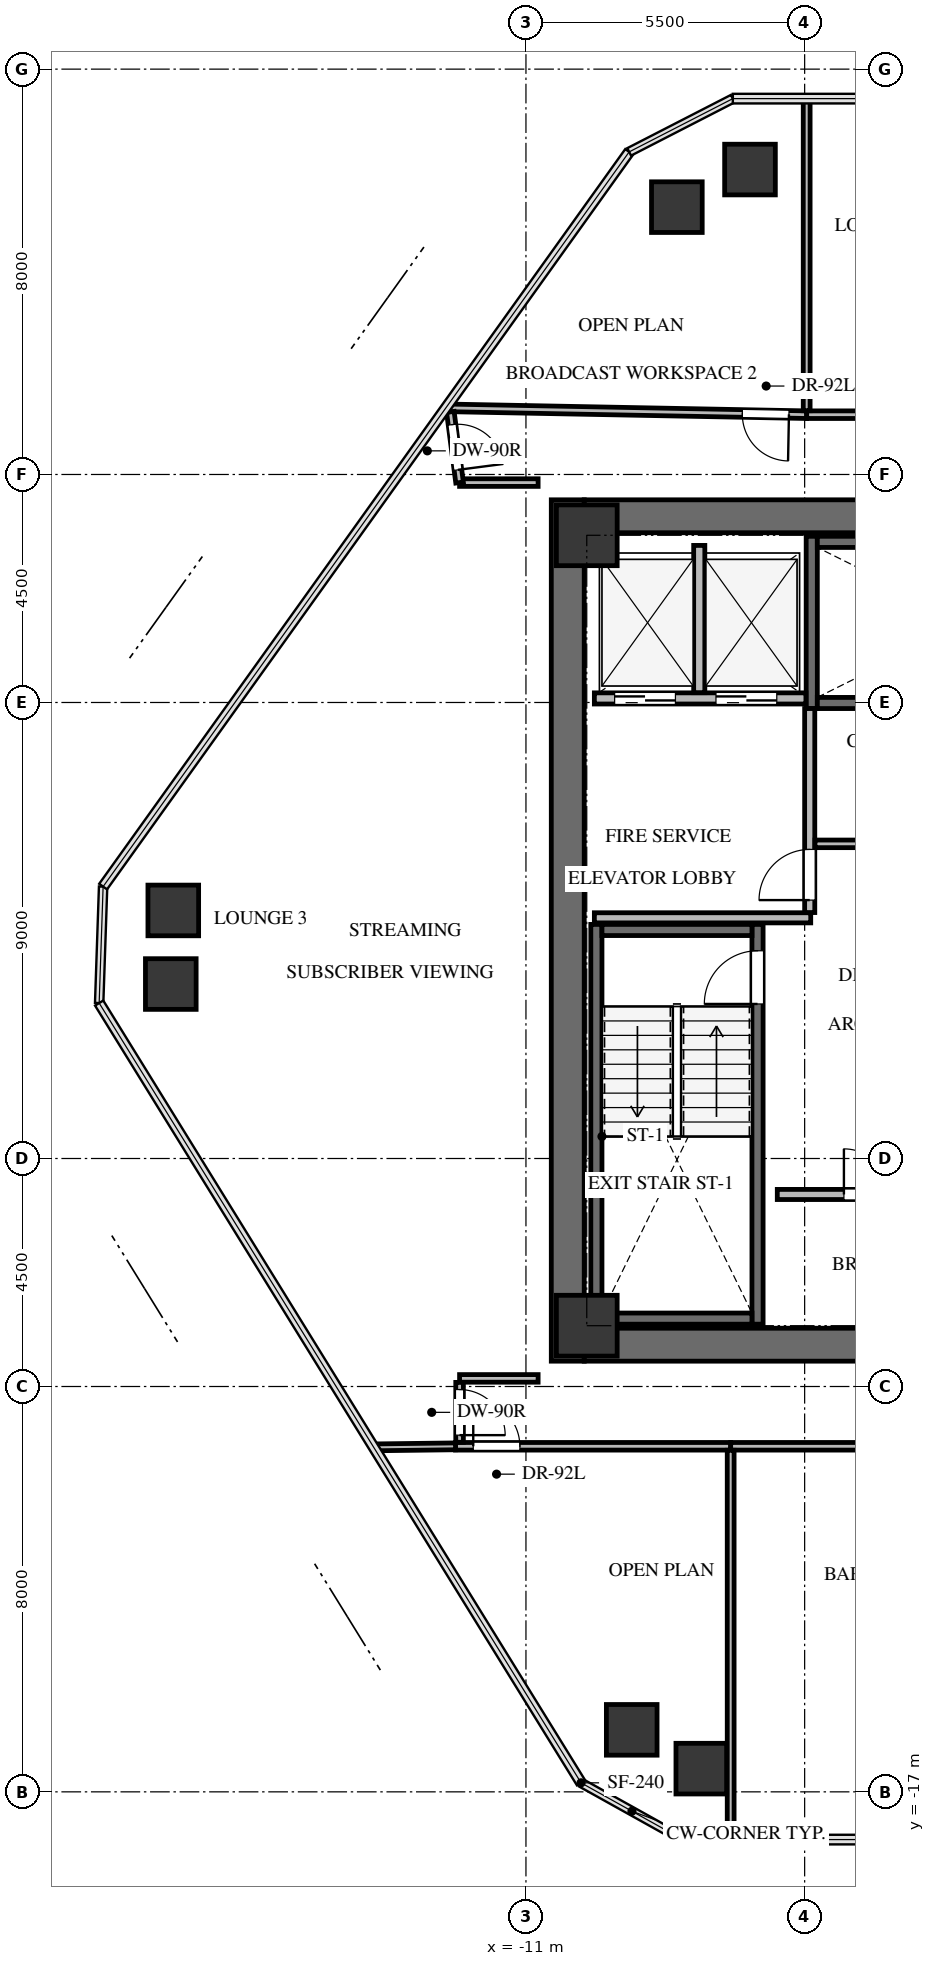
"""IFC4 building model, lengths in metres.
Left out: names, types, materials, properties, quantities, classifications, styles, units other than length and angle.
Written with IfcOpenShell. Run it as: python <this file> out.ifc"""

import sys

from ifc_helpers import new_model, si_unit, direction, frame, frame_2d, origin, origin_2d, place, context, subcontext, project, spatial, rectangle, extrude, source, transform, mapped, element, fill, save


model = new_model("IFC4")
c1 = context("Model", 3, precision=1e-05, world=origin(), true_north=direction((0.0, 1.0)))
c2 = subcontext(c1, "Body", "Model", "MODEL_VIEW")
j1 = project(units=[si_unit("LENGTHUNIT", "METRE"), si_unit("PLANEANGLEUNIT", "RADIAN")], contexts=[c1])
p1 = place(None, origin())
s1 = spatial("IfcSite", under=j1, at=p1, CompositionType="ELEMENT")
p2 = place(p1, origin())
s2 = spatial("IfcBuilding", under=s1, at=p2, CompositionType="ELEMENT")
p3 = place(p2, frame((0.0, 0.0, 183.7)))
s3 = spatial("IfcBuildingStorey", under=s2, at=p3, CompositionType="ELEMENT", Elevation=183.7)
p4 = place(p3, frame((-10.175, -8.5, 0.0), z_axis=(0.0, 0.0, 1.0), x_axis=(0.0, 1.0, 0.0)))
e1 = element("IfcWall", 1, at=p4, inside=s3, PredefinedType="SHEAR", context=c2, shape_type="SweptSolid", body=[
    extrude(rectangle(XDim=17.0, YDim=0.65, at=frame_2d((8.5, 0.0))), origin(), (0.0, 0.0, 1.0), 3.3),
])
p5 = place(p3, frame((-9.85, -8.175, 0.0), z_axis=(0.0, 0.0, 1.0), x_axis=(1.0, 0.0, 0.0)))
e2 = element("IfcWall", 2, at=p5, inside=s3, PredefinedType="SHEAR", context=c2, shape_type="SweptSolid", body=[
    extrude(rectangle(XDim=7.75, YDim=0.65, at=frame_2d((3.875, 0.0))), origin(), (0.0, 0.0, 1.0), 3.3),
])
p6 = place(p3, frame((-9.85, 8.175, 0.0), z_axis=(0.0, 0.0, 1.0), x_axis=(1.0, 0.0, 0.0)))
e3 = element("IfcWall", 3, at=p6, inside=s3, PredefinedType="SHEAR", context=c2, shape_type="SweptSolid", body=[
    extrude(rectangle(XDim=19.7, YDim=0.65, at=frame_2d((9.85, 0.0))), origin(), (0.0, 0.0, 1.0), 3.3),
])
p7 = place(p3, frame((-6.43, -7.77, -0.24), z_axis=(0.0, 0.0, 1.0), x_axis=(0.0, 1.0, 0.0)))
e4 = element("IfcWall", 4, at=p7, inside=s3, PredefinedType="SHEAR", context=c2, shape_type="SweptSolid", body=[
    extrude(rectangle(XDim=7.89, YDim=0.22, at=frame_2d((3.945, 0.0))), origin(), (0.0, 0.0, 1.0), 3.3),
])
p8 = place(p7, frame((6.32, 0.0, 0.0)))
e5 = element("IfcOpeningElement", 5, at=p8, cuts=e4, PredefinedType="OPENING", context=c2, shape_type="SweptSolid", body=[
    extrude(rectangle(XDim=1.05, YDim=2.15, at=frame_2d((0.525, 1.075))), frame((0.0, 0.12, 0.0), z_axis=(0.0, -1.0, 0.0), x_axis=(1.0, 0.0, 0.0)), (0.0, 0.0, 1.0), 0.24),
])
p9 = place(p3, frame((-9.61, 0.12, -0.24), z_axis=(0.0, 0.0, 1.0), x_axis=(0.0, -1.0, 0.0)))
e6 = element("IfcWall", 6, at=p9, inside=s3, PredefinedType="SHEAR", context=c2, shape_type="SweptSolid", body=[
    extrude(rectangle(XDim=7.89, YDim=0.22, at=frame_2d((3.945, 0.0))), origin(), (0.0, 0.0, 1.0), 3.3),
])
for number, where, z_axis, x_axis in (
    (7, (-9.5, -7.66, -0.24), (0.0, 0.0, 1.0), (1.0, 0.0, 0.0)),
    (8, (-6.54, 0.01, -0.24), (0.0, 0.0, 1.0), (-1.0, 0.0, 0.0)),
):
    element("IfcWall", number, at=place(p3, frame(where, z_axis=z_axis, x_axis=x_axis)), inside=s3, PredefinedType="SHEAR", context=c2, shape_type="SweptSolid", body=[
        extrude(rectangle(XDim=2.96, YDim=0.22, at=frame_2d((1.48, 0.0))), origin(), (0.0, 0.0, 1.0), 3.3),
    ])
p10 = place(p3, frame((-5.36, 7.78, -0.24), z_axis=(0.0, 0.0, 1.0), x_axis=(0.0, -1.0, 0.0)))
e9 = element("IfcWall", 9, at=p10, inside=s3, PredefinedType="SHEAR", context=c2, shape_type="SweptSolid", body=[
    extrude(rectangle(XDim=3.4, YDim=0.22, at=frame_2d((1.7, 0.0))), origin(), (0.0, 0.0, 1.0), 3.3),
])
p11 = place(p3, frame((-5.25, 4.49, -0.24), z_axis=(0.0, 0.0, 1.0), x_axis=(1.0, 0.0, 0.0)))
e10 = element("IfcWall", 10, at=p11, inside=s3, PredefinedType="SHEAR", context=c2, shape_type="SweptSolid", body=[
    extrude(rectangle(XDim=7.35, YDim=0.22, at=frame_2d((3.675, 0.0))), origin(), (0.0, 0.0, 1.0), 3.3),
])
p12 = place(p11, frame((5.85, 0.0, 0.0)))
e11 = element("IfcOpeningElement", 11, at=p12, cuts=e10, PredefinedType="OPENING", context=c2, shape_type="SweptSolid", body=[
    extrude(rectangle(XDim=1.05, YDim=2.15, at=frame_2d((0.525, 1.075))), frame((0.0, 0.12, 0.0), z_axis=(0.0, -1.0, 0.0), x_axis=(1.0, 0.0, 0.0)), (0.0, 0.0, 1.0), 0.24),
])
p13 = place(p3, frame((2.1, 7.67, -0.24), z_axis=(0.0, 0.0, 1.0), x_axis=(-1.0, 0.0, 0.0)))
e12 = element("IfcWall", 12, at=p13, inside=s3, PredefinedType="SHEAR", context=c2, shape_type="SweptSolid", body=[
    extrude(rectangle(XDim=7.35, YDim=0.22, at=frame_2d((3.675, 0.0))), origin(), (0.0, 0.0, 1.0), 3.3),
])
m1 = source(origin(), c2, "Body", "SweptSolid", [
    extrude(rectangle(XDim=1.2, YDim=1.2, at=origin_2d()), origin(), (0.0, 0.0, 1.0), 3.3),
])
for number, where, z_axis, x_axis in (
    (13, (-9.8, -7.8, -0.24), (0.0, 0.0, 1.0), (1.0, 0.0, 0.0)),
    (14, (-9.8, 7.8, -0.24), (0.0, 0.0, 1.0), (1.0, 0.0, 0.0)),
):
    element("IfcColumn", number, at=place(p3, frame(where, z_axis=z_axis, x_axis=x_axis)), inside=s3, PredefinedType="COLUMN", context=c2, shape_type="MappedRepresentation", body=[
        mapped(m1, transform((0.0, 0.0, 0.0), x_axis=(1.0, 0.0, 0.0), y_axis=(0.0, 1.0, 0.0), z_axis=(0.0, 0.0, 1.0), scale=1.0)),
    ])
m2 = source(origin(), c2, "Body", "SweptSolid", [
    extrude(rectangle(XDim=1.0, YDim=1.0, at=origin_2d()), origin(), (0.0, 0.0, 1.0), 3.3),
])
for number, where, z_axis, x_axis in (
    (15, (-8.913, -15.776, -0.24), (0.0, 0.0, 1.0), (1.0, 0.0, 0.0)),
    (16, (-18.009, -1.057, -0.24), (0.0, 0.0, 1.0), (1.0, 0.0, 0.0)),
    (17, (-17.96, 0.396, -0.24), (0.0, 0.0, 1.0), (1.0, 0.0, 0.0)),
    (18, (-8.022, 14.276, -0.24), (0.0, 0.0, 1.0), (1.0, 0.0, 0.0)),
    (19, (-6.579, 15.018, -0.24), (0.0, 0.0, 1.0), (1.0, 0.0, 0.0)),
    (20, (-7.54, -16.542, -0.24), (0.0, 0.0, 1.0), (1.0, 0.0, 0.0)),
):
    element("IfcColumn", number, at=place(p3, frame(where, z_axis=z_axis, x_axis=x_axis)), inside=s3, PredefinedType="COLUMN", context=c2, shape_type="MappedRepresentation", body=[
        mapped(m2, transform((0.0, 0.0, 0.0), x_axis=(1.0, 0.0, 0.0), y_axis=(0.0, 1.0, 0.0), z_axis=(0.0, 0.0, 1.0), scale=1.0)),
    ])
p14 = place(p3, frame((-9.65, 4.58, 0.0), z_axis=(0.0, 0.0, 1.0), x_axis=(1.0, 0.0, 0.0)))
e21 = element("IfcWall", 21, at=p14, inside=s3, PredefinedType="SOLIDWALL", context=c2, shape_type="SweptSolid", body=[
    extrude(rectangle(XDim=4.175, YDim=0.22, at=frame_2d((2.087, 0.0))), origin(), (0.0, 0.0, 1.0), 3.045),
])
p15 = place(p14, frame((0.4, 0.0, 0.0)))
e22 = element("IfcOpeningElement", 22, at=p15, cuts=e21, PredefinedType="OPENING", context=c2, shape_type="SweptSolid", body=[
    extrude(rectangle(XDim=1.2, YDim=2.15, at=frame_2d((0.6, 1.075))), frame((0.0, 0.12, 0.0), z_axis=(0.0, -1.0, 0.0), x_axis=(1.0, 0.0, 0.0)), (0.0, 0.0, 1.0), 0.24),
])
p16 = place(p14, frame((2.4, 0.0, 0.0)))
e23 = element("IfcOpeningElement", 23, at=p16, cuts=e21, PredefinedType="OPENING", context=c2, shape_type="SweptSolid", body=[
    extrude(rectangle(XDim=1.2, YDim=2.15, at=frame_2d((0.6, 1.075))), frame((0.0, 0.12, 0.0), z_axis=(0.0, -1.0, 0.0), x_axis=(1.0, 0.0, 0.0)), (0.0, 0.0, 1.0), 0.24),
])
p17 = place(p3, frame((-7.58, 4.694, 0.0), z_axis=(0.0, 0.0, 1.0), x_axis=(0.0, 1.0, 0.0)))
e24 = element("IfcWall", 24, at=p17, inside=s3, PredefinedType="SOLIDWALL", context=c2, shape_type="SweptSolid", body=[
    extrude(rectangle(XDim=2.906, YDim=0.22, at=frame_2d((1.453, 0.0))), origin(), (0.0, 0.0, 1.0), 3.045),
])
p18 = place(p3, frame((-9.65, 0.25, 0.0), z_axis=(0.0, 0.0, 1.0), x_axis=(1.0, 0.0, 0.0)))
e25 = element("IfcWall", 25, at=p18, inside=s3, PredefinedType="SOLIDWALL", context=c2, shape_type="SweptSolid", body=[
    extrude(rectangle(XDim=4.27, YDim=0.2, at=frame_2d((2.135, 0.0))), origin(), (0.0, 0.0, 1.0), 3.045),
])
p19 = place(p3, frame((-5.4, 0.354, 0.0), z_axis=(0.0, 0.0, 1.0), x_axis=(0.0, 1.0, 0.0)))
e26 = element("IfcWall", 26, at=p19, inside=s3, PredefinedType="SOLIDWALL", context=c2, shape_type="SweptSolid", body=[
    extrude(rectangle(XDim=4.026, YDim=0.2, at=frame_2d((2.013, 0.0))), origin(), (0.0, 0.0, 1.0), 3.045),
])
p20 = place(p19, frame((0.246, 0.0, 0.0)))
e27 = element("IfcOpeningElement", 27, at=p20, cuts=e26, PredefinedType="OPENING", context=c2, shape_type="SweptSolid", body=[
    extrude(rectangle(XDim=1.0, YDim=2.15, at=frame_2d((0.5, 1.075))), frame((0.0, 0.11, 0.0), z_axis=(0.0, -1.0, 0.0), x_axis=(1.0, 0.0, 0.0)), (0.0, 0.0, 1.0), 0.22),
])
p21 = place(p3, frame((-6.04, -5.21, 0.0), z_axis=(0.0, 0.0, 1.0), x_axis=(1.0, 0.0, 0.0)))
e28 = element("IfcWall", 28, at=p21, inside=s3, PredefinedType="SOLIDWALL", context=c2, shape_type="SweptSolid", body=[
    extrude(rectangle(XDim=3.53, YDim=0.2, at=frame_2d((1.765, 0.0))), origin(), (0.0, 0.0, 1.0), 3.045),
])
p22 = place(p21, frame((1.315, 0.0, 0.0)))
e29 = element("IfcOpeningElement", 29, at=p22, cuts=e28, PredefinedType="OPENING", context=c2, shape_type="SweptSolid", body=[
    extrude(rectangle(XDim=0.9, YDim=2.05, at=frame_2d((0.45, 1.025))), frame((0.0, 0.11, 0.0), z_axis=(0.0, -1.0, 0.0), x_axis=(1.0, 0.0, 0.0)), (0.0, 0.0, 1.0), 0.22),
])
p23 = place(p3, frame((0.52, 1.71, 0.0), z_axis=(0.0, 0.0, 1.0), x_axis=(-1.0, 0.0, 0.0)))
e30 = element("IfcWall", 30, at=p23, inside=s3, PredefinedType="PARTITIONING", context=c2, shape_type="SweptSolid", body=[
    extrude(rectangle(XDim=5.816, YDim=0.15, at=frame_2d((2.908, 0.0))), origin(), (0.0, 0.0, 1.0), 3.045),
])
p24 = place(p23, frame((2.458, 0.0, 0.0)))
e31 = element("IfcOpeningElement", 31, at=p24, cuts=e30, PredefinedType="OPENING", context=c2, shape_type="SweptSolid", body=[
    extrude(rectangle(XDim=0.9, YDim=2.05, at=frame_2d((0.45, 1.025))), frame((0.0, 0.085, 0.0), z_axis=(0.0, -1.0, 0.0), x_axis=(1.0, 0.0, 0.0)), (0.0, 0.0, 1.0), 0.17),
])
p25 = place(p3, frame((-5.46, 10.18, 0.0), z_axis=(0.0, 0.0, 1.0), x_axis=(-0.99981828266, 0.019063096779, 0.0)))
e32 = element("IfcWall", 32, at=p25, inside=s3, PredefinedType="PARTITIONING", context=c2, shape_type="SweptSolid", body=[
    extrude(rectangle(XDim=7.121, YDim=0.15, at=frame_2d((3.56, 0.0))), origin(), (0.0, 0.0, 1.0), 2.242),
])
p26 = place(p25, frame((0.35, 0.0, 0.0)))
e33 = element("IfcOpeningElement", 33, at=p26, cuts=e32, PredefinedType="OPENING", context=c2, shape_type="SweptSolid", body=[
    extrude(rectangle(XDim=0.92, YDim=2.1, at=frame_2d((0.46, 1.05))), frame((0.0, 0.085, 0.0), z_axis=(0.0, -1.0, 0.0), x_axis=(1.0, 0.0, 0.0)), (0.0, 0.0, 1.0), 0.17),
])
p27 = place(p3, frame((-1.089, 10.18, 0.0), z_axis=(0.0, 0.0, 1.0), x_axis=(-1.0, 0.0, 0.0)))
e34 = element("IfcWall", 34, at=p27, inside=s3, PredefinedType="PARTITIONING", context=c2, shape_type="SweptSolid", body=[
    extrude(rectangle(XDim=4.371, YDim=0.15, at=frame_2d((2.186, 0.0))), origin(), (0.0, 0.0, 1.0), 2.608),
])
p28 = place(p3, frame((-12.39, -10.18, 0.0), z_axis=(0.0, 0.0, 1.0), x_axis=(1.0, 0.0, 0.0)))
e35 = element("IfcWall", 35, at=p28, inside=s3, PredefinedType="PARTITIONING", context=c2, shape_type="SweptSolid", body=[
    extrude(rectangle(XDim=5.43, YDim=0.15, at=frame_2d((2.715, 0.0))), origin(), (0.0, 0.0, 1.0), 2.399),
])
p29 = place(p28, frame((0.35, 0.0, 0.0)))
e36 = element("IfcOpeningElement", 36, at=p29, cuts=e35, PredefinedType="OPENING", context=c2, shape_type="SweptSolid", body=[
    extrude(rectangle(XDim=0.92, YDim=2.1, at=frame_2d((0.46, 1.05))), frame((0.0, 0.085, 0.0), z_axis=(0.0, -1.0, 0.0), x_axis=(1.0, 0.0, 0.0)), (0.0, 0.0, 1.0), 0.17),
])
p30 = place(p3, frame((-6.96, -10.18, 0.0), z_axis=(0.0, 0.0, 1.0), x_axis=(1.0, 0.0, 0.0)))
e37 = element("IfcWall", 37, at=p30, inside=s3, PredefinedType="PARTITIONING", context=c2, shape_type="SweptSolid", body=[
    extrude(rectangle(XDim=5.871, YDim=0.15, at=frame_2d((2.936, 0.0))), origin(), (0.0, 0.0, 1.0), 2.242),
])
p31 = place(p3, frame((-10.76, -8.84, 0.0), z_axis=(0.0, 0.0, 1.0), x_axis=(-1.0, 0.0, 0.0)))
e38 = element("IfcWall", 38, at=p31, inside=s3, PredefinedType="PARTITIONING", context=c2, shape_type="SweptSolid", body=[
    extrude(rectangle(XDim=1.55, YDim=0.15, at=frame_2d((0.775, 0.0))), origin(), (0.0, 0.0, 1.0), 3.045),
])
p32 = place(p3, frame((-12.31, -8.919, 0.0), z_axis=(0.0, 0.0, 1.0), x_axis=(0.0, -1.0, 0.0)))
e39 = element("IfcWall", 39, at=p32, inside=s3, PredefinedType="PARTITIONING", context=c2, shape_type="SweptSolid", body=[
    extrude(rectangle(XDim=1.182, YDim=0.15, at=frame_2d((0.591, 0.0))), origin(), (0.0, 0.0, 1.0), 2.399),
])
p33 = place(p32, frame((0.141, 0.0, 0.0)))
e40 = element("IfcOpeningElement", 40, at=p33, cuts=e39, PredefinedType="OPENING", context=c2, shape_type="SweptSolid", body=[
    extrude(rectangle(XDim=0.9, YDim=2.05, at=frame_2d((0.45, 1.025))), frame((0.0, 0.085, 0.0), z_axis=(0.0, -1.0, 0.0), x_axis=(1.0, 0.0, 0.0)), (0.0, 0.0, 1.0), 0.17),
])
p34 = place(p3, frame((-12.31, 8.84, 0.0), z_axis=(0.0, 0.0, 1.0), x_axis=(1.0, 0.0, 0.0)))
e41 = element("IfcWall", 41, at=p34, inside=s3, PredefinedType="PARTITIONING", context=c2, shape_type="SweptSolid", body=[
    extrude(rectangle(XDim=1.55, YDim=0.15, at=frame_2d((0.775, 0.0))), origin(), (0.0, 0.0, 1.0), 2.399),
])
p35 = place(p3, frame((-12.492, 10.235, 0.0), z_axis=(0.0, 0.0, 1.0), x_axis=(0.129309502928, -0.991604282187, 0.0)))
e42 = element("IfcWall", 42, at=p35, inside=s3, PredefinedType="PARTITIONING", context=c2, shape_type="SweptSolid", body=[
    extrude(rectangle(XDim=1.406, YDim=0.15, at=frame_2d((0.703, 0.0))), origin(), (0.0, 0.0, 1.0), 3.045),
])
p36 = place(p35, frame((0.253, 0.0, 0.0)))
e43 = element("IfcOpeningElement", 43, at=p36, cuts=e42, PredefinedType="OPENING", context=c2, shape_type="SweptSolid", body=[
    extrude(rectangle(XDim=0.9, YDim=2.05, at=frame_2d((0.45, 1.025))), frame((0.0, 0.085, 0.0), z_axis=(0.0, -1.0, 0.0), x_axis=(1.0, 0.0, 0.0)), (0.0, 0.0, 1.0), 0.17),
])
p37 = place(p3, frame((-5.46, 16.418, 0.0), z_axis=(0.0, 0.0, 1.0), x_axis=(0.0, -1.0, 0.0)))
e44 = element("IfcWall", 44, at=p37, inside=s3, PredefinedType="PARTITIONING", context=c2, shape_type="SweptSolid", body=[
    extrude(rectangle(XDim=6.159, YDim=0.135, at=frame_2d((3.08, 0.0))), origin(), (0.0, 0.0, 1.0), 2.399),
])
p38 = place(p3, frame((-6.96, -10.259, 0.0), z_axis=(0.0, 0.0, 1.0), x_axis=(0.0, -1.0, 0.0)))
e45 = element("IfcWall", 45, at=p38, inside=s3, PredefinedType="PARTITIONING", context=c2, shape_type="SweptSolid", body=[
    extrude(rectangle(XDim=7.683, YDim=0.135, at=frame_2d((3.841, 0.0))), origin(), (0.0, 0.0, 1.0), 2.242),
])
p39 = place(p3, frame((-14.004, -10.201, 0.0), z_axis=(0.0, 0.0, 1.0), x_axis=(0.999923084603, 0.012402615782, 0.0)))
e46 = element("IfcWall", 46, at=p39, inside=s3, PredefinedType="PARTITIONING", context=c2, shape_type="SweptSolid", body=[
    extrude(rectangle(XDim=1.614, YDim=0.135, at=frame_2d((0.807, 0.0))), origin(), (0.0, 0.0, 1.0), 2.399),
])
m3 = source(origin(), c2, "Body", "SweptSolid", [
    extrude(rectangle(XDim=1.05, YDim=2.15, at=frame_2d((0.525, 1.075))), frame((0.0, 0.025, 0.0), z_axis=(0.0, -1.0, 0.0), x_axis=(1.0, 0.0, 0.0)), (0.0, 0.0, 1.0), 0.05),
])
p40 = place(p8, origin())
e47 = element("IfcDoor", 47, at=p40, inside=s3, OperationType="SINGLE_SWING_LEFT", PredefinedType="DOOR", context=c2, shape_type="MappedRepresentation", body=[
    mapped(m3, transform((0.0, 0.0, 0.0), x_axis=(1.0, 0.0, 0.0), y_axis=(0.0, 1.0, 0.0), z_axis=(0.0, 0.0, 1.0), scale=1.0)),
])
fill(e5, e47)
m4 = source(origin(), c2, "Body", "SweptSolid", [
    extrude(rectangle(XDim=1.2, YDim=2.15, at=frame_2d((0.6, 1.075))), frame((0.0, 0.025, 0.0), z_axis=(0.0, -1.0, 0.0), x_axis=(1.0, 0.0, 0.0)), (0.0, 0.0, 1.0), 0.05),
])
p41 = place(p15, origin())
e48 = element("IfcDoor", 48, at=p41, inside=s3, OperationType="DOUBLE_DOOR_SLIDING", PredefinedType="DOOR", context=c2, shape_type="MappedRepresentation", body=[
    mapped(m4, transform((0.0, 0.0, 0.0), x_axis=(1.0, 0.0, 0.0), y_axis=(0.0, 1.0, 0.0), z_axis=(0.0, 0.0, 1.0), scale=1.0)),
])
fill(e22, e48)
p42 = place(p16, origin())
e49 = element("IfcDoor", 49, at=p42, inside=s3, OperationType="DOUBLE_DOOR_SLIDING", PredefinedType="DOOR", context=c2, shape_type="MappedRepresentation", body=[
    mapped(m4, transform((0.0, 0.0, 0.0), x_axis=(1.0, 0.0, 0.0), y_axis=(0.0, 1.0, 0.0), z_axis=(0.0, 0.0, 1.0), scale=1.0)),
])
fill(e23, e49)
m5 = source(origin(), c2, "Body", "SweptSolid", [
    extrude(rectangle(XDim=1.0, YDim=2.15, at=frame_2d((0.5, 1.075))), frame((0.0, 0.025, 0.0), z_axis=(0.0, -1.0, 0.0), x_axis=(1.0, 0.0, 0.0)), (0.0, 0.0, 1.0), 0.05),
])
p43 = place(p20, origin())
e50 = element("IfcDoor", 50, at=p43, inside=s3, OperationType="SINGLE_SWING_LEFT", PredefinedType="DOOR", context=c2, shape_type="MappedRepresentation", body=[
    mapped(m5, transform((0.0, 0.0, 0.0), x_axis=(1.0, 0.0, 0.0), y_axis=(0.0, 1.0, 0.0), z_axis=(0.0, 0.0, 1.0), scale=1.0)),
])
fill(e27, e50)
m6 = source(origin(), c2, "Body", "SweptSolid", [
    extrude(rectangle(XDim=0.9, YDim=2.05, at=frame_2d((0.45, 1.025))), frame((0.0, 0.025, 0.0), z_axis=(0.0, -1.0, 0.0), x_axis=(1.0, 0.0, 0.0)), (0.0, 0.0, 1.0), 0.05),
])
p44 = place(p22, origin())
e51 = element("IfcDoor", 51, at=p44, inside=s3, OperationType="SINGLE_SWING_LEFT", PredefinedType="DOOR", context=c2, shape_type="MappedRepresentation", body=[
    mapped(m6, transform((0.0, 0.0, 0.0), x_axis=(1.0, 0.0, 0.0), y_axis=(0.0, 1.0, 0.0), z_axis=(0.0, 0.0, 1.0), scale=1.0)),
])
fill(e29, e51)
m7 = source(origin(), c2, "Body", "SweptSolid", [
    extrude(rectangle(XDim=0.92, YDim=2.1, at=frame_2d((0.46, 1.05))), frame((0.0, 0.025, 0.0), z_axis=(0.0, -1.0, 0.0), x_axis=(1.0, 0.0, 0.0)), (0.0, 0.0, 1.0), 0.05),
])
p45 = place(p26, origin())
e52 = element("IfcDoor", 52, at=p45, inside=s3, OperationType="SINGLE_SWING_LEFT", PredefinedType="DOOR", context=c2, shape_type="MappedRepresentation", body=[
    mapped(m7, transform((0.0, 0.0, 0.0), x_axis=(1.0, 0.0, 0.0), y_axis=(0.0, 1.0, 0.0), z_axis=(0.0, 0.0, 1.0), scale=1.0)),
])
fill(e33, e52)
p46 = place(p29, origin())
e53 = element("IfcDoor", 53, at=p46, inside=s3, OperationType="SINGLE_SWING_LEFT", PredefinedType="DOOR", context=c2, shape_type="MappedRepresentation", body=[
    mapped(m7, transform((0.0, 0.0, 0.0), x_axis=(1.0, 0.0, 0.0), y_axis=(0.0, 1.0, 0.0), z_axis=(0.0, 0.0, 1.0), scale=1.0)),
])
fill(e36, e53)
m8 = source(origin(), c2, "Body", "SweptSolid", [
    extrude(rectangle(XDim=0.9, YDim=2.05, at=frame_2d((0.45, 1.025))), frame((0.0, 0.025, 0.0), z_axis=(0.0, -1.0, 0.0), x_axis=(1.0, 0.0, 0.0)), (0.0, 0.0, 1.0), 0.05),
])
p47 = place(p33, origin())
e54 = element("IfcDoor", 54, at=p47, inside=s3, OperationType="SINGLE_SWING_RIGHT", PredefinedType="DOOR", context=c2, shape_type="MappedRepresentation", body=[
    mapped(m8, transform((0.0, 0.0, 0.0), x_axis=(1.0, 0.0, 0.0), y_axis=(0.0, 1.0, 0.0), z_axis=(0.0, 0.0, 1.0), scale=1.0)),
])
fill(e40, e54)
p48 = place(p36, origin())
e55 = element("IfcDoor", 55, at=p48, inside=s3, OperationType="SINGLE_SWING_RIGHT", PredefinedType="DOOR", context=c2, shape_type="MappedRepresentation", body=[
    mapped(m8, transform((0.0, 0.0, 0.0), x_axis=(1.0, 0.0, 0.0), y_axis=(0.0, 1.0, 0.0), z_axis=(0.0, 0.0, 1.0), scale=1.0)),
])
fill(e43, e55)
save(model, sys.argv[1])
